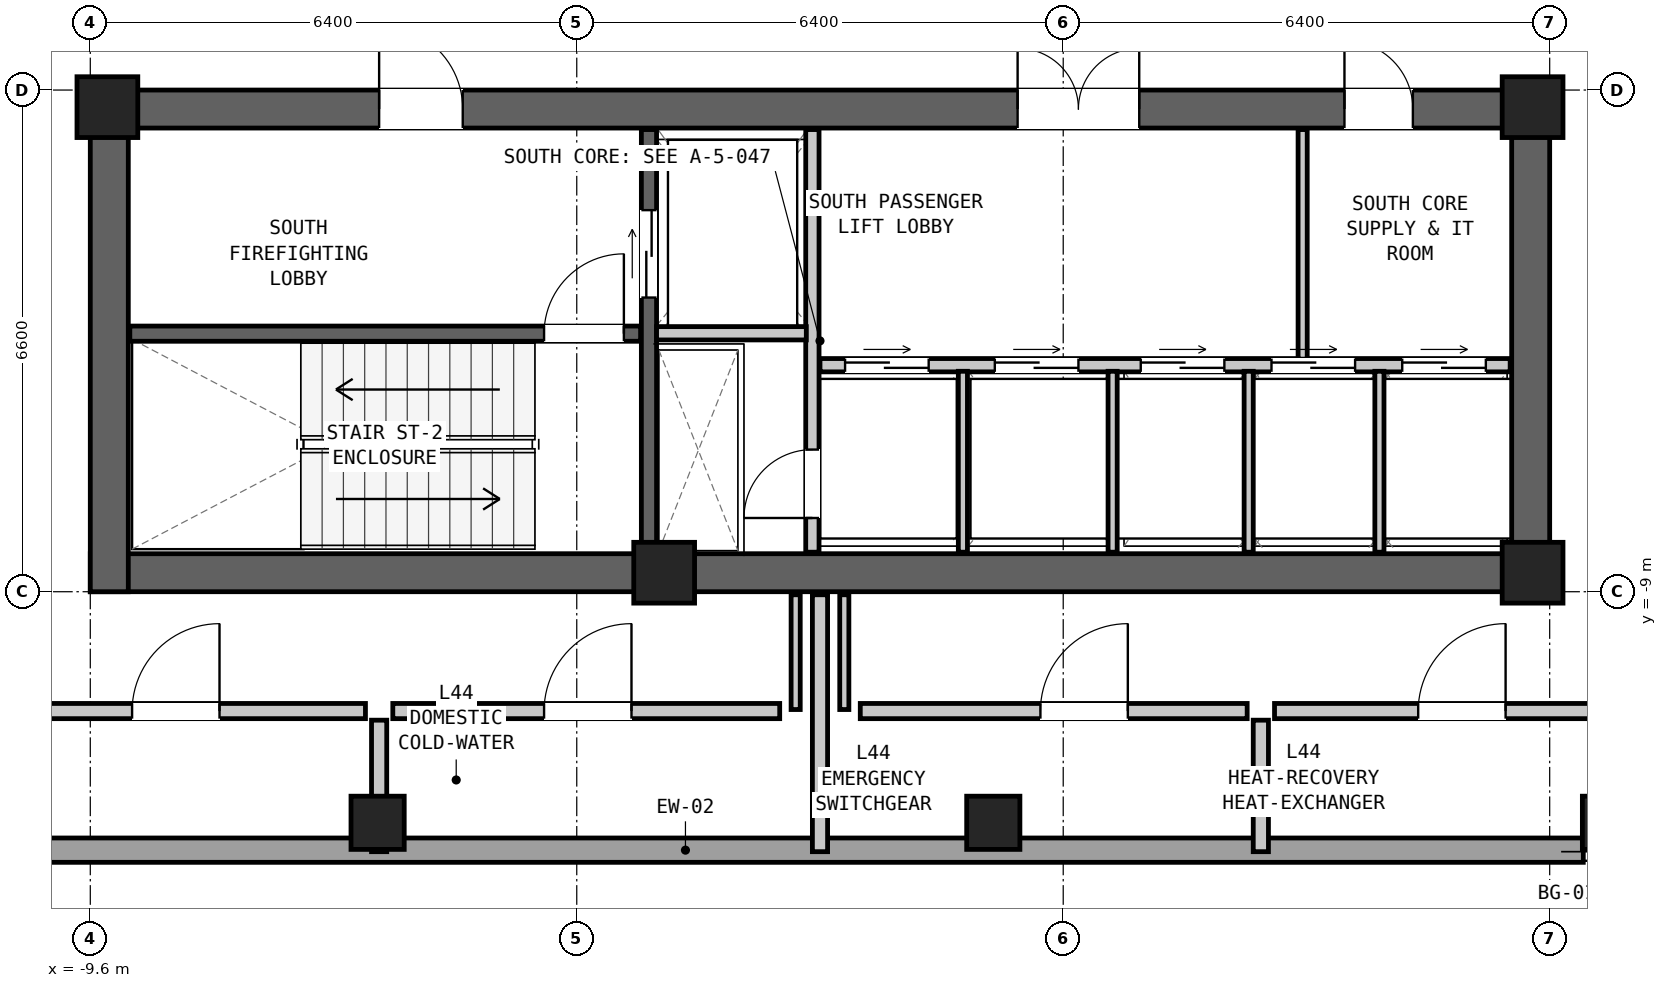
"""IFC4 building model, lengths in metres.
Left out: names, types, materials, properties, quantities, classifications, styles, units other than length and angle.
Written with IfcOpenShell. Run it as: python <this file> out.ifc"""

import sys

from ifc_helpers import new_model, si_unit, direction, frame, frame_2d, origin, origin_2d, place, context, subcontext, project, spatial, rectangle, hollow_rectangle, extrude, element, fill, save


model = new_model("IFC4")
c1 = context("Model", 3, precision=1e-05, world=origin(), true_north=direction((0.0, 1.0)))
c2 = subcontext(c1, "Body", "Model", "MODEL_VIEW")
j1 = project(units=[si_unit("LENGTHUNIT", "METRE"), si_unit("PLANEANGLEUNIT", "RADIAN")], contexts=[c1])
p1 = place(None, origin())
s1 = spatial("IfcSite", under=j1, at=p1, CompositionType="ELEMENT")
p2 = place(p1, origin())
s2 = spatial("IfcBuilding", under=s1, at=p2, CompositionType="ELEMENT")
p3 = place(p2, frame((0.0, 0.0, 151.8)))
s3 = spatial("IfcBuildingStorey", under=s2, at=p3, CompositionType="ELEMENT", Elevation=151.8)
p4 = place(p3, frame((-9.6, -8.75, 0.0), z_axis=(0.0, 0.0, 1.0), x_axis=(1.0, 0.0, 0.0)))
e1 = element("IfcWall", 1, at=p4, inside=s3, PredefinedType="SHEAR", context=c2, shape_type="SweptSolid", body=[
    extrude(rectangle(XDim=19.2, YDim=0.5, at=frame_2d((9.6, 0.0))), origin(), (0.0, 0.0, 1.0), 4.35),
])
p5 = place(p3, frame((-9.6, -2.65, 0.0), z_axis=(0.0, 0.0, 1.0), x_axis=(1.0, 0.0, 0.0)))
e2 = element("IfcWall", 2, at=p5, inside=s3, PredefinedType="SHEAR", context=c2, shape_type="SweptSolid", body=[
    extrude(rectangle(XDim=19.2, YDim=0.5, at=frame_2d((9.6, 0.0))), origin(), (0.0, 0.0, 1.0), 4.35),
])
p6 = place(p5, frame((3.8, 0.0, 0.0)))
e3 = element("IfcOpeningElement", 3, at=p6, cuts=e2, PredefinedType="OPENING", context=c2, shape_type="SweptSolid", body=[
    extrude(rectangle(XDim=1.1, YDim=2.08, at=frame_2d((0.55, 1.04))), frame((0.0, 0.262, 0.0), z_axis=(0.0, -1.0, 0.0), x_axis=(1.0, 0.0, 0.0)), (0.0, 0.0, 1.0), 0.524),
])
p7 = place(p5, frame((12.2, 0.0, 0.0)))
e4 = element("IfcOpeningElement", 4, at=p7, cuts=e2, PredefinedType="OPENING", context=c2, shape_type="SweptSolid", body=[
    extrude(rectangle(XDim=1.6, YDim=2.12, at=frame_2d((0.8, 1.06))), frame((0.0, 0.262, 0.0), z_axis=(0.0, -1.0, 0.0), x_axis=(1.0, 0.0, 0.0)), (0.0, 0.0, 1.0), 0.524),
])
p8 = place(p5, frame((16.5, 0.0, 0.0)))
e5 = element("IfcOpeningElement", 5, at=p8, cuts=e2, PredefinedType="OPENING", context=c2, shape_type="SweptSolid", body=[
    extrude(rectangle(XDim=0.9, YDim=2.05, at=frame_2d((0.45, 1.025))), frame((0.0, 0.262, 0.0), z_axis=(0.0, -1.0, 0.0), x_axis=(1.0, 0.0, 0.0)), (0.0, 0.0, 1.0), 0.524),
])
for number, where, z_axis, x_axis in (
    (6, (-9.35, -9.0, 0.0), (0.0, 0.0, 1.0), (0.0, 1.0, 0.0)),
    (7, (9.35, -9.0, 0.0), (0.0, 0.0, 1.0), (0.0, 1.0, 0.0)),
):
    element("IfcWall", number, at=place(p3, frame(where, z_axis=z_axis, x_axis=x_axis)), inside=s3, PredefinedType="SHEAR", context=c2, shape_type="SweptSolid", body=[
        extrude(rectangle(XDim=6.6, YDim=0.5, at=frame_2d((3.3, 0.0))), origin(), (0.0, 0.0, 1.0), 4.35),
    ])
for number, where, z_axis, x_axis in (
    (8, (-5.82, -12.04, 0.0), (0.0, 0.0, 1.0), (1.0, 0.0, 0.0)),
    (9, (2.28, -12.04, 0.0), (0.0, 0.0, 1.0), (1.0, 0.0, 0.0)),
    (10, (10.38, -12.04, 0.0), (0.0, 0.0, 1.0), (1.0, 0.0, 0.0)),
):
    element("IfcColumn", number, at=place(p3, frame(where, z_axis=z_axis, x_axis=x_axis)), inside=s3, PredefinedType="COLUMN", context=c2, shape_type="SweptSolid", body=[
        extrude(hollow_rectangle(XDim=0.7, YDim=0.7, WallThickness=0.045, at=origin_2d()), origin(), (0.0, 0.0, 1.0), 4.35),
    ])
for number, where, z_axis, x_axis in (
    (11, (-9.375, -2.625, 0.0), (0.0, 0.0, 1.0), (1.0, 0.0, 0.0)),
    (12, (9.375, -2.625, 0.0), (0.0, 0.0, 1.0), (1.0, 0.0, 0.0)),
    (13, (-2.05, -8.75, 0.0), (0.0, 0.0, 1.0), (1.0, 0.0, 0.0)),
    (14, (9.375, -8.75, 0.0), (0.0, 0.0, 1.0), (1.0, 0.0, 0.0)),
):
    element("IfcColumn", number, at=place(p3, frame(where, z_axis=z_axis, x_axis=x_axis)), inside=s3, PredefinedType="COLUMN", context=c2, shape_type="SweptSolid", body=[
        extrude(rectangle(XDim=0.8, YDim=0.8, at=origin_2d()), origin(), (0.0, 0.0, 1.0), 4.35),
    ])
p9 = place(p3, frame((10.042, -12.4, 0.0), z_axis=(0.0, 0.0, 1.0), x_axis=(-1.0, 0.0, 0.0)))
e15 = element("IfcWall", 15, at=p9, inside=s3, PredefinedType="SOLIDWALL", context=c2, shape_type="SweptSolid", body=[
    extrude(rectangle(XDim=23.624, YDim=0.32, at=frame_2d((11.812, 0.0))), origin(), (0.0, 0.0, 1.0), 2.31),
])
p10 = place(p3, frame((-9.08, -5.605, 0.0), z_axis=(0.0, 0.0, 1.0), x_axis=(1.0, 0.0, 0.0)))
e16 = element("IfcWall", 16, at=p10, inside=s3, PredefinedType="SHEAR", context=c2, shape_type="SweptSolid", body=[
    extrude(rectangle(XDim=6.72, YDim=0.2, at=frame_2d((3.36, 0.0))), origin(), (0.0, 0.0, 1.0), 4.13),
])
p11 = place(p10, frame((5.45, 0.0, 0.0)))
e17 = element("IfcOpeningElement", 17, at=p11, cuts=e16, PredefinedType="OPENING", context=c2, shape_type="SweptSolid", body=[
    extrude(rectangle(XDim=1.05, YDim=2.08, at=frame_2d((0.525, 1.04))), frame((0.0, 0.112, 0.0), z_axis=(0.0, -1.0, 0.0), x_axis=(1.0, 0.0, 0.0)), (0.0, 0.0, 1.0), 0.224),
])
p12 = place(p3, frame((-2.25, -8.48, 0.0), z_axis=(0.0, 0.0, 1.0), x_axis=(0.0, 1.0, 0.0)))
e18 = element("IfcWall", 18, at=p12, inside=s3, PredefinedType="SHEAR", context=c2, shape_type="SweptSolid", body=[
    extrude(rectangle(XDim=5.56, YDim=0.2, at=frame_2d((2.78, 0.0))), origin(), (0.0, 0.0, 1.0), 4.13),
])
p13 = place(p12, frame((3.35, 0.0, 0.0)))
e19 = element("IfcOpeningElement", 19, at=p13, cuts=e18, PredefinedType="OPENING", context=c2, shape_type="SweptSolid", body=[
    extrude(rectangle(XDim=1.15, YDim=2.08, at=frame_2d((0.575, 1.04))), frame((0.0, 0.112, 0.0), z_axis=(0.0, -1.0, 0.0), x_axis=(1.0, 0.0, 0.0)), (0.0, 0.0, 1.0), 0.224),
])
p14 = place(p3, frame((-0.1, -8.48, 0.0), z_axis=(0.0, 0.0, 1.0), x_axis=(0.0, 1.0, 0.0)))
e20 = element("IfcWall", 20, at=p14, inside=s3, PredefinedType="PARTITIONING", context=c2, shape_type="SweptSolid", body=[
    extrude(rectangle(XDim=5.56, YDim=0.175, at=frame_2d((2.78, 0.0))), origin(), (0.0, 0.0, 1.0), 2.31),
])
p15 = place(p14, frame((0.45, 0.0, 0.0)))
e21 = element("IfcOpeningElement", 21, at=p15, cuts=e20, PredefinedType="OPENING", context=c2, shape_type="SweptSolid", body=[
    extrude(rectangle(XDim=0.9, YDim=2.05, at=frame_2d((0.45, 1.025))), frame((0.0, 0.1, 0.0), z_axis=(0.0, -1.0, 0.0), x_axis=(1.0, 0.0, 0.0)), (0.0, 0.0, 1.0), 0.199),
])
p16 = place(p3, frame((-2.15, -5.6, 0.0), z_axis=(0.0, 0.0, 1.0), x_axis=(1.0, 0.0, 0.0)))
e22 = element("IfcWall", 22, at=p16, inside=s3, PredefinedType="PARTITIONING", context=c2, shape_type="SweptSolid", body=[
    extrude(rectangle(XDim=1.97, YDim=0.175, at=frame_2d((0.985, 0.0))), origin(), (0.0, 0.0, 1.0), 4.13),
])
p17 = place(p3, frame((0.0, -6.02, 0.0), z_axis=(0.0, 0.0, 1.0), x_axis=(1.0, 0.0, 0.0)))
e23 = element("IfcWall", 23, at=p17, inside=s3, PredefinedType="PARTITIONING", context=c2, shape_type="SweptSolid", body=[
    extrude(rectangle(XDim=9.08, YDim=0.175, at=frame_2d((4.54, 0.0))), origin(), (0.0, 0.0, 1.0), 4.13),
])
p18 = place(p17, frame((0.33, 0.0, 0.0)))
e24 = element("IfcOpeningElement", 24, at=p18, cuts=e23, PredefinedType="OPENING", context=c2, shape_type="SweptSolid", body=[
    extrude(rectangle(XDim=1.1, YDim=2.06, at=frame_2d((0.55, 1.03))), frame((0.0, 0.1, 0.0), z_axis=(0.0, -1.0, 0.0), x_axis=(1.0, 0.0, 0.0)), (0.0, 0.0, 1.0), 0.199),
])
p19 = place(p17, frame((2.3, 0.0, 0.0)))
e25 = element("IfcOpeningElement", 25, at=p19, cuts=e23, PredefinedType="OPENING", context=c2, shape_type="SweptSolid", body=[
    extrude(rectangle(XDim=1.1, YDim=2.06, at=frame_2d((0.55, 1.03))), frame((0.0, 0.1, 0.0), z_axis=(0.0, -1.0, 0.0), x_axis=(1.0, 0.0, 0.0)), (0.0, 0.0, 1.0), 0.199),
])
p20 = place(p17, frame((4.22, 0.0, 0.0)))
e26 = element("IfcOpeningElement", 26, at=p20, cuts=e23, PredefinedType="OPENING", context=c2, shape_type="SweptSolid", body=[
    extrude(rectangle(XDim=1.1, YDim=2.06, at=frame_2d((0.55, 1.03))), frame((0.0, 0.1, 0.0), z_axis=(0.0, -1.0, 0.0), x_axis=(1.0, 0.0, 0.0)), (0.0, 0.0, 1.0), 0.199),
])
p21 = place(p17, frame((5.94, 0.0, 0.0)))
e27 = element("IfcOpeningElement", 27, at=p21, cuts=e23, PredefinedType="OPENING", context=c2, shape_type="SweptSolid", body=[
    extrude(rectangle(XDim=1.1, YDim=2.06, at=frame_2d((0.55, 1.03))), frame((0.0, 0.1, 0.0), z_axis=(0.0, -1.0, 0.0), x_axis=(1.0, 0.0, 0.0)), (0.0, 0.0, 1.0), 0.199),
])
p22 = place(p17, frame((7.66, 0.0, 0.0)))
e28 = element("IfcOpeningElement", 28, at=p22, cuts=e23, PredefinedType="OPENING", context=c2, shape_type="SweptSolid", body=[
    extrude(rectangle(XDim=1.1, YDim=2.06, at=frame_2d((0.55, 1.03))), frame((0.0, 0.1, 0.0), z_axis=(0.0, -1.0, 0.0), x_axis=(1.0, 0.0, 0.0)), (0.0, 0.0, 1.0), 0.199),
])
for number, where, z_axis, x_axis in (
    (29, (1.88, -8.48, 0.0), (0.0, 0.0, 1.0), (0.0, 1.0, 0.0)),
    (30, (3.85, -8.48, 0.0), (0.0, 0.0, 1.0), (0.0, 1.0, 0.0)),
    (31, (5.64, -8.48, 0.0), (0.0, 0.0, 1.0), (0.0, 1.0, 0.0)),
    (32, (7.36, -8.48, 0.0), (0.0, 0.0, 1.0), (0.0, 1.0, 0.0)),
):
    element("IfcWall", number, at=place(p3, frame(where, z_axis=z_axis, x_axis=x_axis)), inside=s3, PredefinedType="PARTITIONING", context=c2, shape_type="SweptSolid", body=[
        extrude(rectangle(XDim=2.38, YDim=0.12, at=frame_2d((1.19, 0.0))), origin(), (0.0, 0.0, 1.0), 4.13),
    ])
p23 = place(p3, frame((6.35, -5.94, 0.0), z_axis=(0.0, 0.0, 1.0), x_axis=(0.0, 1.0, 0.0)))
e33 = element("IfcWall", 33, at=p23, inside=s3, PredefinedType="PARTITIONING", context=c2, shape_type="SweptSolid", body=[
    extrude(rectangle(XDim=3.02, YDim=0.12, at=frame_2d((1.51, 0.0))), origin(), (0.0, 0.0, 1.0), 4.13),
])
p24 = place(p3, frame((0.0, -12.42, 0.0), z_axis=(0.0, 0.0, 1.0), x_axis=(0.0, 1.0, 0.0)))
e34 = element("IfcWall", 34, at=p24, inside=s3, PredefinedType="PARTITIONING", context=c2, shape_type="SweptSolid", body=[
    extrude(rectangle(XDim=3.38, YDim=0.2, at=frame_2d((1.69, 0.0))), origin(), (0.0, 0.0, 1.0), 2.31),
])
for number, where, z_axis, x_axis in (
    (35, (-0.32, -10.55, 0.0), (0.0, 0.0, 1.0), (0.0, 1.0, 0.0)),
    (36, (0.32, -10.55, 0.0), (0.0, 0.0, 1.0), (0.0, 1.0, 0.0)),
):
    element("IfcWall", number, at=place(p3, frame(where, z_axis=z_axis, x_axis=x_axis)), inside=s3, PredefinedType="PARTITIONING", context=c2, shape_type="SweptSolid", body=[
        extrude(rectangle(XDim=1.51, YDim=0.12, at=frame_2d((0.755, 0.0))), origin(), (0.0, 0.0, 1.0), 2.31),
    ])
p25 = place(p3, frame((-10.97, -10.57, 0.0), z_axis=(0.0, 0.0, 1.0), x_axis=(1.0, 0.0, 0.0)))
e37 = element("IfcWall", 37, at=p25, inside=s3, PredefinedType="PARTITIONING", context=c2, shape_type="SweptSolid", body=[
    extrude(rectangle(XDim=4.99, YDim=0.2, at=frame_2d((2.495, 0.0))), origin(), (0.0, 0.0, 1.0), 4.13),
])
p26 = place(p25, frame((1.92, 0.0, 0.0)))
e38 = element("IfcOpeningElement", 38, at=p26, cuts=e37, PredefinedType="OPENING", context=c2, shape_type="SweptSolid", body=[
    extrude(rectangle(XDim=1.15, YDim=2.1, at=frame_2d((0.575, 1.05))), frame((0.0, 0.112, 0.0), z_axis=(0.0, -1.0, 0.0), x_axis=(1.0, 0.0, 0.0)), (0.0, 0.0, 1.0), 0.224),
])
p27 = place(p3, frame((-5.8, -12.42, 0.0), z_axis=(0.0, 0.0, 1.0), x_axis=(0.0, 1.0, 0.0)))
e39 = element("IfcWall", 39, at=p27, inside=s3, PredefinedType="PARTITIONING", context=c2, shape_type="SweptSolid", body=[
    extrude(rectangle(XDim=1.73, YDim=0.2, at=frame_2d((0.865, 0.0))), origin(), (0.0, 0.0, 1.0), 3.647),
])
p28 = place(p3, frame((-5.62, -10.57, 0.0), z_axis=(0.0, 0.0, 1.0), x_axis=(1.0, 0.0, 0.0)))
e40 = element("IfcWall", 40, at=p28, inside=s3, PredefinedType="PARTITIONING", context=c2, shape_type="SweptSolid", body=[
    extrude(rectangle(XDim=5.09, YDim=0.2, at=frame_2d((2.545, 0.0))), origin(), (0.0, 0.0, 1.0), 4.13),
])
p29 = place(p28, frame((1.99, 0.0, 0.0)))
e41 = element("IfcOpeningElement", 41, at=p29, cuts=e40, PredefinedType="OPENING", context=c2, shape_type="SweptSolid", body=[
    extrude(rectangle(XDim=1.15, YDim=2.1, at=frame_2d((0.575, 1.05))), frame((0.0, 0.112, 0.0), z_axis=(0.0, -1.0, 0.0), x_axis=(1.0, 0.0, 0.0)), (0.0, 0.0, 1.0), 0.224),
])
p30 = place(p3, frame((0.53, -10.57, 0.0), z_axis=(0.0, 0.0, 1.0), x_axis=(1.0, 0.0, 0.0)))
e42 = element("IfcWall", 42, at=p30, inside=s3, PredefinedType="PARTITIONING", context=c2, shape_type="SweptSolid", body=[
    extrude(rectangle(XDim=5.09, YDim=0.2, at=frame_2d((2.545, 0.0))), origin(), (0.0, 0.0, 1.0), 4.13),
])
p31 = place(p30, frame((2.37, 0.0, 0.0)))
e43 = element("IfcOpeningElement", 43, at=p31, cuts=e42, PredefinedType="OPENING", context=c2, shape_type="SweptSolid", body=[
    extrude(rectangle(XDim=1.15, YDim=2.1, at=frame_2d((0.575, 1.05))), frame((0.0, 0.112, 0.0), z_axis=(0.0, -1.0, 0.0), x_axis=(1.0, 0.0, 0.0)), (0.0, 0.0, 1.0), 0.224),
])
p32 = place(p3, frame((5.8, -12.42, 0.0), z_axis=(0.0, 0.0, 1.0), x_axis=(0.0, 1.0, 0.0)))
e44 = element("IfcWall", 44, at=p32, inside=s3, PredefinedType="PARTITIONING", context=c2, shape_type="SweptSolid", body=[
    extrude(rectangle(XDim=1.73, YDim=0.2, at=frame_2d((0.865, 0.0))), origin(), (0.0, 0.0, 1.0), 3.647),
])
p33 = place(p3, frame((5.98, -10.57, 0.0), z_axis=(0.0, 0.0, 1.0), x_axis=(1.0, 0.0, 0.0)))
e45 = element("IfcWall", 45, at=p33, inside=s3, PredefinedType="PARTITIONING", context=c2, shape_type="SweptSolid", body=[
    extrude(rectangle(XDim=4.99, YDim=0.2, at=frame_2d((2.495, 0.0))), origin(), (0.0, 0.0, 1.0), 4.13),
])
p34 = place(p33, frame((1.89, 0.0, 0.0)))
e46 = element("IfcOpeningElement", 46, at=p34, cuts=e45, PredefinedType="OPENING", context=c2, shape_type="SweptSolid", body=[
    extrude(rectangle(XDim=1.15, YDim=2.1, at=frame_2d((0.575, 1.05))), frame((0.0, 0.112, 0.0), z_axis=(0.0, -1.0, 0.0), x_axis=(1.0, 0.0, 0.0)), (0.0, 0.0, 1.0), 0.224),
])
p35 = place(p11, origin())
e47 = element("IfcDoor", 47, at=p35, inside=s3, OperationType="SINGLE_SWING_RIGHT", PredefinedType="DOOR", context=c2, shape_type="SweptSolid", body=[
    extrude(rectangle(XDim=1.05, YDim=2.08, at=frame_2d((0.525, 1.04))), frame((0.0, 0.025, 0.0), z_axis=(0.0, -1.0, 0.0), x_axis=(1.0, 0.0, 0.0)), (0.0, 0.0, 1.0), 0.05),
])
fill(e17, e47)
p36 = place(p6, origin())
e48 = element("IfcDoor", 48, at=p36, inside=s3, OperationType="SINGLE_SWING_LEFT", PredefinedType="DOOR", context=c2, shape_type="SweptSolid", body=[
    extrude(rectangle(XDim=1.1, YDim=2.08, at=frame_2d((0.55, 1.04))), frame((0.0, 0.025, 0.0), z_axis=(0.0, -1.0, 0.0), x_axis=(1.0, 0.0, 0.0)), (0.0, 0.0, 1.0), 0.05),
])
fill(e3, e48)
p37 = place(p13, origin())
e49 = element("IfcDoor", 49, at=p37, inside=s3, OperationType="DOUBLE_DOOR_SLIDING", PredefinedType="DOOR", context=c2, shape_type="SweptSolid", body=[
    extrude(rectangle(XDim=1.15, YDim=2.08, at=frame_2d((0.575, 1.04))), frame((0.0, 0.025, 0.0), z_axis=(0.0, -1.0, 0.0), x_axis=(1.0, 0.0, 0.0)), (0.0, 0.0, 1.0), 0.05),
])
fill(e19, e49)
p38 = place(p15, origin())
e50 = element("IfcDoor", 50, at=p38, inside=s3, OperationType="SINGLE_SWING_LEFT", PredefinedType="DOOR", context=c2, shape_type="SweptSolid", body=[
    extrude(rectangle(XDim=0.9, YDim=2.05, at=frame_2d((0.45, 1.025))), frame((0.0, 0.025, 0.0), z_axis=(0.0, -1.0, 0.0), x_axis=(1.0, 0.0, 0.0)), (0.0, 0.0, 1.0), 0.05),
])
fill(e21, e50)
p39 = place(p18, origin())
e51 = element("IfcDoor", 51, at=p39, inside=s3, OperationType="DOUBLE_DOOR_SLIDING", PredefinedType="DOOR", context=c2, shape_type="SweptSolid", body=[
    extrude(rectangle(XDim=1.1, YDim=2.06, at=frame_2d((0.55, 1.03))), frame((0.0, 0.025, 0.0), z_axis=(0.0, -1.0, 0.0), x_axis=(1.0, 0.0, 0.0)), (0.0, 0.0, 1.0), 0.05),
])
fill(e24, e51)
p40 = place(p19, origin())
e52 = element("IfcDoor", 52, at=p40, inside=s3, OperationType="DOUBLE_DOOR_SLIDING", PredefinedType="DOOR", context=c2, shape_type="SweptSolid", body=[
    extrude(rectangle(XDim=1.1, YDim=2.06, at=frame_2d((0.55, 1.03))), frame((0.0, 0.025, 0.0), z_axis=(0.0, -1.0, 0.0), x_axis=(1.0, 0.0, 0.0)), (0.0, 0.0, 1.0), 0.05),
])
fill(e25, e52)
p41 = place(p7, origin())
e53 = element("IfcDoor", 53, at=p41, inside=s3, OperationType="DOUBLE_DOOR_SINGLE_SWING", PredefinedType="DOOR", context=c2, shape_type="SweptSolid", body=[
    extrude(rectangle(XDim=1.6, YDim=2.12, at=frame_2d((0.8, 1.06))), frame((0.0, 0.025, 0.0), z_axis=(0.0, -1.0, 0.0), x_axis=(1.0, 0.0, 0.0)), (0.0, 0.0, 1.0), 0.05),
])
fill(e4, e53)
p42 = place(p8, origin())
e54 = element("IfcDoor", 54, at=p42, inside=s3, OperationType="SINGLE_SWING_LEFT", PredefinedType="DOOR", context=c2, shape_type="SweptSolid", body=[
    extrude(rectangle(XDim=0.9, YDim=2.05, at=frame_2d((0.45, 1.025))), frame((0.0, 0.025, 0.0), z_axis=(0.0, -1.0, 0.0), x_axis=(1.0, 0.0, 0.0)), (0.0, 0.0, 1.0), 0.05),
])
fill(e5, e54)
p43 = place(p26, origin())
e55 = element("IfcDoor", 55, at=p43, inside=s3, OperationType="SINGLE_SWING_RIGHT", PredefinedType="DOOR", context=c2, shape_type="SweptSolid", body=[
    extrude(rectangle(XDim=1.15, YDim=2.1, at=frame_2d((0.575, 1.05))), frame((0.0, 0.025, 0.0), z_axis=(0.0, -1.0, 0.0), x_axis=(1.0, 0.0, 0.0)), (0.0, 0.0, 1.0), 0.05),
])
fill(e38, e55)
p44 = place(p29, origin())
e56 = element("IfcDoor", 56, at=p44, inside=s3, OperationType="SINGLE_SWING_RIGHT", PredefinedType="DOOR", context=c2, shape_type="SweptSolid", body=[
    extrude(rectangle(XDim=1.15, YDim=2.1, at=frame_2d((0.575, 1.05))), frame((0.0, 0.025, 0.0), z_axis=(0.0, -1.0, 0.0), x_axis=(1.0, 0.0, 0.0)), (0.0, 0.0, 1.0), 0.05),
])
fill(e41, e56)
p45 = place(p31, origin())
e57 = element("IfcDoor", 57, at=p45, inside=s3, OperationType="SINGLE_SWING_RIGHT", PredefinedType="DOOR", context=c2, shape_type="SweptSolid", body=[
    extrude(rectangle(XDim=1.15, YDim=2.1, at=frame_2d((0.575, 1.05))), frame((0.0, 0.025, 0.0), z_axis=(0.0, -1.0, 0.0), x_axis=(1.0, 0.0, 0.0)), (0.0, 0.0, 1.0), 0.05),
])
fill(e43, e57)
p46 = place(p34, origin())
e58 = element("IfcDoor", 58, at=p46, inside=s3, OperationType="SINGLE_SWING_RIGHT", PredefinedType="DOOR", context=c2, shape_type="SweptSolid", body=[
    extrude(rectangle(XDim=1.15, YDim=2.1, at=frame_2d((0.575, 1.05))), frame((0.0, 0.025, 0.0), z_axis=(0.0, -1.0, 0.0), x_axis=(1.0, 0.0, 0.0)), (0.0, 0.0, 1.0), 0.05),
])
fill(e46, e58)
p47 = place(p20, origin())
e59 = element("IfcDoor", 59, at=p47, inside=s3, OperationType="DOUBLE_DOOR_SLIDING", PredefinedType="DOOR", context=c2, shape_type="SweptSolid", body=[
    extrude(rectangle(XDim=1.1, YDim=2.06, at=frame_2d((0.55, 1.03))), frame((0.0, 0.025, 0.0), z_axis=(0.0, -1.0, 0.0), x_axis=(1.0, 0.0, 0.0)), (0.0, 0.0, 1.0), 0.05),
])
fill(e26, e59)
p48 = place(p21, origin())
e60 = element("IfcDoor", 60, at=p48, inside=s3, OperationType="DOUBLE_DOOR_SLIDING", PredefinedType="DOOR", context=c2, shape_type="SweptSolid", body=[
    extrude(rectangle(XDim=1.1, YDim=2.06, at=frame_2d((0.55, 1.03))), frame((0.0, 0.025, 0.0), z_axis=(0.0, -1.0, 0.0), x_axis=(1.0, 0.0, 0.0)), (0.0, 0.0, 1.0), 0.05),
])
fill(e27, e60)
p49 = place(p22, origin())
e61 = element("IfcDoor", 61, at=p49, inside=s3, OperationType="DOUBLE_DOOR_SLIDING", PredefinedType="DOOR", context=c2, shape_type="SweptSolid", body=[
    extrude(rectangle(XDim=1.1, YDim=2.06, at=frame_2d((0.55, 1.03))), frame((0.0, 0.025, 0.0), z_axis=(0.0, -1.0, 0.0), x_axis=(1.0, 0.0, 0.0)), (0.0, 0.0, 1.0), 0.05),
])
fill(e28, e61)
save(model, sys.argv[1])
